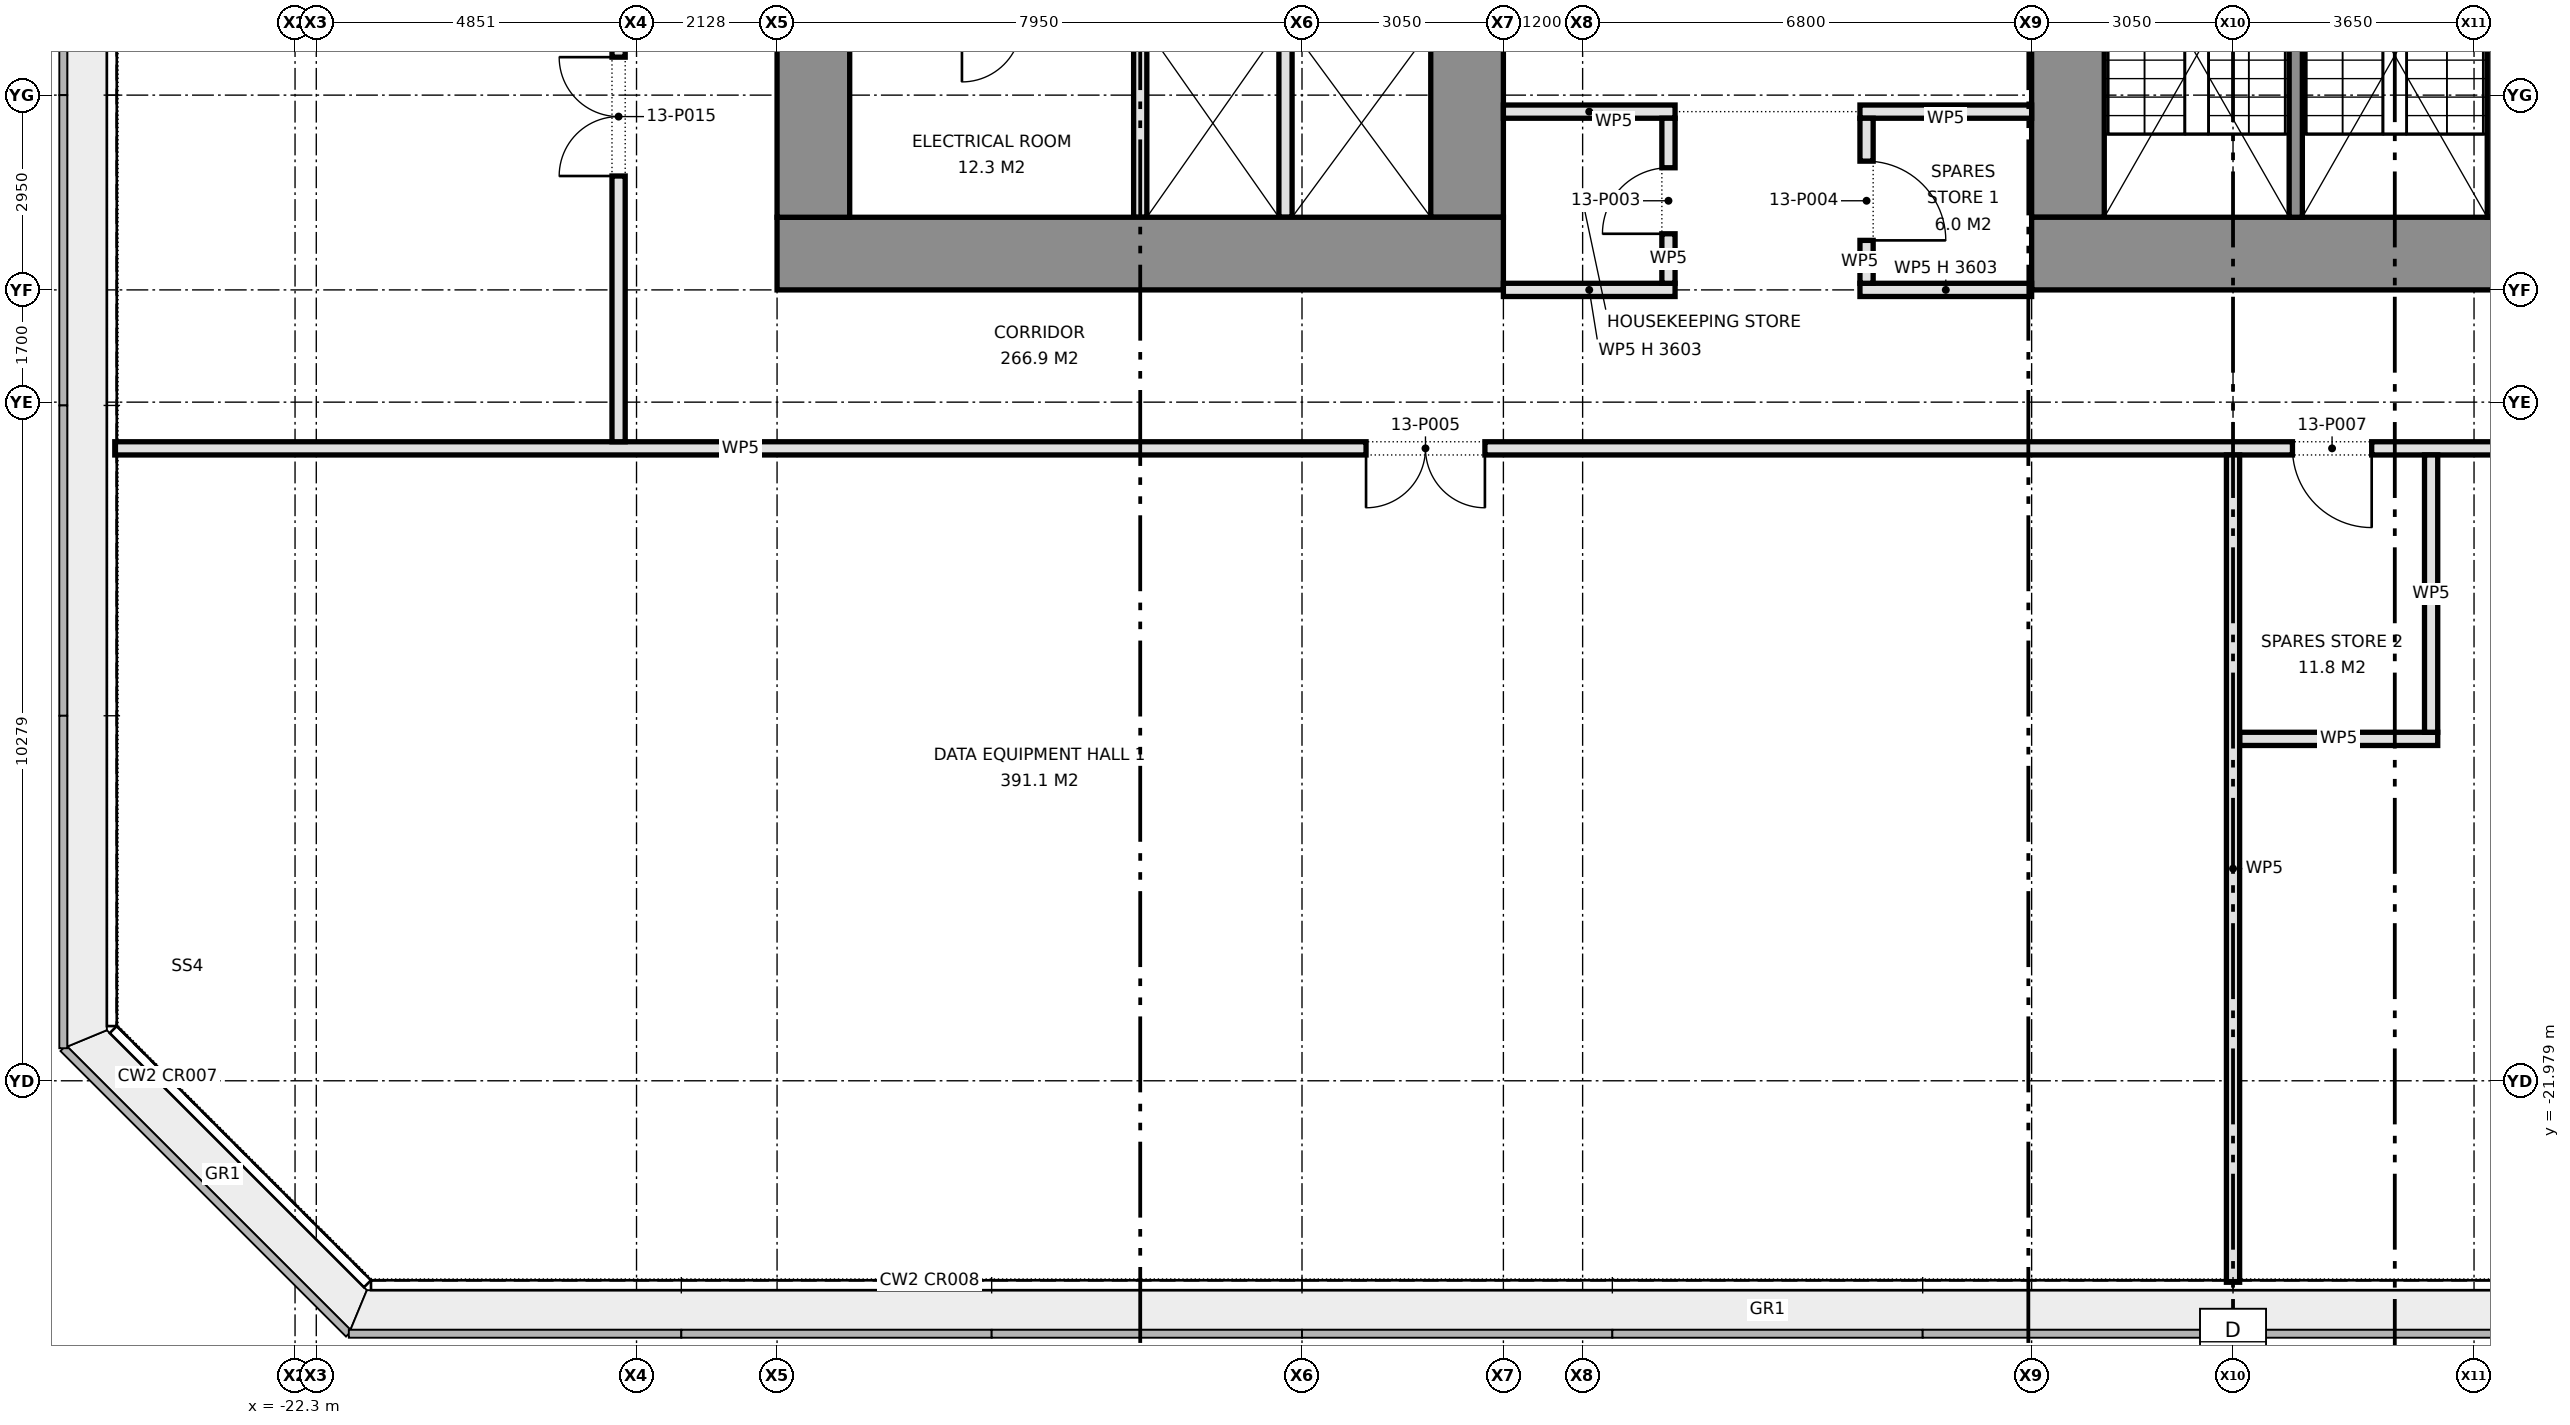
"""IFC4 building model, lengths in metres.
Left out: names, types, materials, properties, quantities, classifications, styles, units other than length and angle.
Written with IfcOpenShell. Run it as: python <this file> out.ifc"""

import sys

from ifc_helpers import new_model, si_unit, direction, frame, frame_2d, origin, place, context, subcontext, project, spatial, rectangle, extrude, element, fill, save


model = new_model("IFC4")
c1 = context("Model", 3, precision=1e-05, world=origin(), true_north=direction((0.0, 1.0)))
c2 = subcontext(c1, "Body", "Model", "MODEL_VIEW")
j1 = project(units=[si_unit("LENGTHUNIT", "METRE"), si_unit("PLANEANGLEUNIT", "RADIAN")], contexts=[c1])
p1 = place(None, origin())
s1 = spatial("IfcSite", under=j1, at=p1, CompositionType="ELEMENT")
p2 = place(p1, origin())
s2 = spatial("IfcBuilding", under=s1, at=p2, CompositionType="ELEMENT")
p3 = place(p2, frame((0.0, 0.0, 59.3)))
s3 = spatial("IfcBuildingStorey", under=s2, at=p3, CompositionType="ELEMENT", Elevation=59.3)
p4 = place(p3, frame((-15.0, -9.45, 0.0), z_axis=(0.0, 0.0, 1.0), x_axis=(1.0, 0.0, 0.0)))
e1 = element("IfcWall", 1, at=p4, inside=s3, PredefinedType="SHEAR", context=c2, shape_type="SweptSolid", body=[
    extrude(rectangle(XDim=11.0, YDim=1.1, at=frame_2d((5.5, 0.0))), origin(), (0.0, 0.0, 1.0), 4.55),
])
for number, where, z_axis, x_axis in (
    (2, (-14.45, -8.9, 0.0), (0.0, 0.0, 1.0), (0.0, 1.0, 0.0)),
    (3, (-4.55, -8.9, 0.0), (0.0, 0.0, 1.0), (0.0, 1.0, 0.0)),
):
    element("IfcWall", number, at=place(p3, frame(where, z_axis=z_axis, x_axis=x_axis)), inside=s3, PredefinedType="SHEAR", context=c2, shape_type="SweptSolid", body=[
        extrude(rectangle(XDim=3.15, YDim=1.1, at=frame_2d((1.575, 0.0))), origin(), (0.0, 0.0, 1.0), 4.55),
    ])
for number, where, z_axis, x_axis in (
    (4, (-9.5, -8.9, 0.0), (0.0, 0.0, 1.0), (0.0, 1.0, 0.0)),
    (5, (-7.3, -8.9, 0.0), (0.0, 0.0, 1.0), (0.0, 1.0, 0.0)),
):
    element("IfcWall", number, at=place(p3, frame(where, z_axis=z_axis, x_axis=x_axis)), inside=s3, PredefinedType="PARTITIONING", context=c2, shape_type="SweptSolid", body=[
        extrude(rectangle(XDim=2.85, YDim=0.2, at=frame_2d((1.425, 0.0))), origin(), (0.0, 0.0, 1.0), 4.55),
    ])
p5 = place(p3, frame((15.0, -9.45, 0.0), z_axis=(0.0, 0.0, 1.0), x_axis=(-1.0, 0.0, 0.0)))
e6 = element("IfcWall", 6, at=p5, inside=s3, PredefinedType="SHEAR", context=c2, shape_type="SweptSolid", body=[
    extrude(rectangle(XDim=11.0, YDim=1.1, at=frame_2d((5.5, 0.0))), origin(), (0.0, 0.0, 1.0), 4.55),
])
p6 = place(p3, frame((4.55, -1.55, 0.0), z_axis=(0.0, 0.0, 1.0), x_axis=(0.0, -1.0, 0.0)))
e7 = element("IfcWall", 7, at=p6, inside=s3, PredefinedType="SHEAR", context=c2, shape_type="SweptSolid", body=[
    extrude(rectangle(XDim=7.35, YDim=1.1, at=frame_2d((3.675, 0.0))), origin(), (0.0, 0.0, 1.0), 4.55),
])
for number, where, z_axis, x_axis in (
    (8, (11.0, -2.38, 0.0), (0.0, 0.0, 1.0), (0.0, -1.0, 0.0)),
    (9, (8.0, -2.38, 0.0), (0.0, 0.0, 1.0), (0.0, -1.0, 0.0)),
):
    element("IfcWall", number, at=place(p3, frame(where, z_axis=z_axis, x_axis=x_axis)), inside=s3, PredefinedType="SHEAR", context=c2, shape_type="SweptSolid", body=[
        extrude(rectangle(XDim=6.52, YDim=0.2, at=frame_2d((3.26, 0.0))), origin(), (0.0, 0.0, 1.0), 4.55),
    ])
p7 = place(p3, frame((7.15, -16.8, 0.0), z_axis=(0.0, 0.0, 1.0), x_axis=(1.0, 0.0, 0.0)))
e10 = element("IfcWall", 10, at=p7, inside=s3, PredefinedType="PARTITIONING", context=c2, shape_type="SweptSolid", body=[
    extrude(rectangle(XDim=3.0, YDim=0.2, at=frame_2d((1.5, 0.0))), origin(), (0.0, 0.0, 1.0), 4.55),
])
p8 = place(p3, frame((-25.03, -12.4, 0.0), z_axis=(0.0, 0.0, 1.0), x_axis=(1.0, 0.0, 0.0)))
e11 = element("IfcWall", 11, at=p8, inside=s3, PredefinedType="PARTITIONING", context=c2, shape_type="SweptSolid", body=[
    extrude(rectangle(XDim=50.06, YDim=0.2, at=frame_2d((25.03, 0.0))), origin(), (0.0, 0.0, 1.0), 4.55),
])
p9 = place(p8, frame((18.95, 0.0, 0.0)))
e12 = element("IfcOpeningElement", 12, at=p9, cuts=e11, PredefinedType="OPENING", context=c2, shape_type="SweptSolid", body=[
    extrude(rectangle(XDim=1.8, YDim=2.1, at=frame_2d((0.9, 1.05))), frame((0.0, 0.11, 0.0), z_axis=(0.0, -1.0, 0.0), x_axis=(1.0, 0.0, 0.0)), (0.0, 0.0, 1.0), 0.22),
])
p10 = place(p8, frame((37.86, 0.0, 0.0)))
e13 = element("IfcOpeningElement", 13, at=p10, cuts=e11, PredefinedType="OPENING", context=c2, shape_type="SweptSolid", body=[
    extrude(rectangle(XDim=1.8, YDim=2.1, at=frame_2d((0.9, 1.05))), frame((0.0, 0.11, 0.0), z_axis=(0.0, -1.0, 0.0), x_axis=(1.0, 0.0, 0.0)), (0.0, 0.0, 1.0), 0.22),
])
p11 = place(p8, frame((32.98, 0.0, 0.0)))
e14 = element("IfcOpeningElement", 14, at=p11, cuts=e11, PredefinedType="OPENING", context=c2, shape_type="SweptSolid", body=[
    extrude(rectangle(XDim=1.2, YDim=2.1, at=frame_2d((0.6, 1.05))), frame((0.0, 0.11, 0.0), z_axis=(0.0, -1.0, 0.0), x_axis=(1.0, 0.0, 0.0)), (0.0, 0.0, 1.0), 0.22),
])
for number, where, z_axis, x_axis in (
    (15, (-4.0, -10.0, 0.0), (0.0, 0.0, 1.0), (1.0, 0.0, 0.0)),
    (16, (1.4, -10.0, 0.0), (0.0, 0.0, 1.0), (1.0, 0.0, 0.0)),
):
    element("IfcWall", number, at=place(p3, frame(where, z_axis=z_axis, x_axis=x_axis)), inside=s3, PredefinedType="PARTITIONING", context=c2, shape_type="SweptSolid", body=[
        extrude(rectangle(XDim=2.6, YDim=0.2, at=frame_2d((1.3, 0.0))), origin(), (0.0, 0.0, 1.0), 3.603),
    ])
for number, where, z_axis, x_axis in (
    (17, (-4.0, -7.3, 0.0), (0.0, 0.0, 1.0), (1.0, 0.0, 0.0)),
    (18, (1.4, -7.3, 0.0), (0.0, 0.0, 1.0), (1.0, 0.0, 0.0)),
):
    element("IfcWall", number, at=place(p3, frame(where, z_axis=z_axis, x_axis=x_axis)), inside=s3, PredefinedType="PARTITIONING", context=c2, shape_type="SweptSolid", body=[
        extrude(rectangle(XDim=2.6, YDim=0.2, at=frame_2d((1.3, 0.0))), origin(), (0.0, 0.0, 1.0), 4.55),
    ])
p12 = place(p3, frame((10.05, -16.7, 0.0), z_axis=(0.0, 0.0, 1.0), x_axis=(0.0, 1.0, 0.0)))
e19 = element("IfcWall", 19, at=p12, inside=s3, PredefinedType="PARTITIONING", context=c2, shape_type="SweptSolid", body=[
    extrude(rectangle(XDim=4.2, YDim=0.2, at=frame_2d((2.1, 0.0))), origin(), (0.0, 0.0, 1.0), 4.55),
])
p13 = place(p3, frame((7.05, -25.03, 0.0), z_axis=(0.0, 0.0, 1.0), x_axis=(0.0, 1.0, 0.0)))
e20 = element("IfcWall", 20, at=p13, inside=s3, PredefinedType="PARTITIONING", context=c2, shape_type="SweptSolid", body=[
    extrude(rectangle(XDim=12.53, YDim=0.2, at=frame_2d((6.265, 0.0))), origin(), (0.0, 0.0, 1.0), 4.55),
])
p14 = place(p3, frame((1.5, -9.9, 0.0), z_axis=(0.0, 0.0, 1.0), x_axis=(0.0, 1.0, 0.0)))
e21 = element("IfcWall", 21, at=p14, inside=s3, PredefinedType="PARTITIONING", context=c2, shape_type="SweptSolid", body=[
    extrude(rectangle(XDim=2.5, YDim=0.2, at=frame_2d((1.25, 0.0))), origin(), (0.0, 0.0, 1.0), 4.55),
])
p15 = place(p14, frame((0.65, 0.0, 0.0)))
e22 = element("IfcOpeningElement", 22, at=p15, cuts=e21, PredefinedType="OPENING", context=c2, shape_type="SweptSolid", body=[
    extrude(rectangle(XDim=1.2, YDim=2.1, at=frame_2d((0.6, 1.05))), frame((0.0, 0.11, 0.0), z_axis=(0.0, -1.0, 0.0), x_axis=(1.0, 0.0, 0.0)), (0.0, 0.0, 1.0), 0.22),
])
p16 = place(p3, frame((-1.5, -9.9, 0.0), z_axis=(0.0, 0.0, 1.0), x_axis=(0.0, 1.0, 0.0)))
e23 = element("IfcWall", 23, at=p16, inside=s3, PredefinedType="PARTITIONING", context=c2, shape_type="SweptSolid", body=[
    extrude(rectangle(XDim=2.5, YDim=0.2, at=frame_2d((1.25, 0.0))), origin(), (0.0, 0.0, 1.0), 4.55),
])
p17 = place(p16, frame((0.75, 0.0, 0.0)))
e24 = element("IfcOpeningElement", 24, at=p17, cuts=e23, PredefinedType="OPENING", context=c2, shape_type="SweptSolid", body=[
    extrude(rectangle(XDim=1.0, YDim=2.1, at=frame_2d((0.5, 1.05))), frame((0.0, 0.11, 0.0), z_axis=(0.0, -1.0, 0.0), x_axis=(1.0, 0.0, 0.0)), (0.0, 0.0, 1.0), 0.22),
])
p18 = place(p3, frame((-17.4, -12.3, 0.0), z_axis=(0.0, 0.0, 1.0), x_axis=(0.0, 1.0, 0.0)))
e25 = element("IfcWall", 25, at=p18, inside=s3, PredefinedType="PARTITIONING", context=c2, shape_type="SweptSolid", body=[
    extrude(rectangle(XDim=28.2, YDim=0.2, at=frame_2d((14.1, 0.0))), origin(), (0.0, 0.0, 1.0), 4.55),
])
p19 = place(p18, frame((4.025, 0.0, 0.0)))
e26 = element("IfcOpeningElement", 26, at=p19, cuts=e25, PredefinedType="OPENING", context=c2, shape_type="SweptSolid", body=[
    extrude(rectangle(XDim=1.8, YDim=2.1, at=frame_2d((0.9, 1.05))), frame((0.0, 0.11, 0.0), z_axis=(0.0, -1.0, 0.0), x_axis=(1.0, 0.0, 0.0)), (0.0, 0.0, 1.0), 0.22),
])
p20 = place(p18, frame((20.525, 0.0, 0.0)))
e27 = element("IfcOpeningElement", 27, at=p20, cuts=e25, PredefinedType="OPENING", context=c2, shape_type="SweptSolid", body=[
    extrude(rectangle(XDim=1.8, YDim=2.1, at=frame_2d((0.9, 1.05))), frame((0.0, 0.11, 0.0), z_axis=(0.0, -1.0, 0.0), x_axis=(1.0, 0.0, 0.0)), (0.0, 0.0, 1.0), 0.22),
])
p21 = place(p18, frame((10.95, 0.0, 0.0)))
e28 = element("IfcOpeningElement", 28, at=p21, cuts=e25, PredefinedType="OPENING", context=c2, shape_type="SweptSolid", body=[
    extrude(rectangle(XDim=1.0, YDim=2.1, at=frame_2d((0.5, 1.05))), frame((0.0, 0.11, 0.0), z_axis=(0.0, -1.0, 0.0), x_axis=(1.0, 0.0, 0.0)), (0.0, 0.0, 1.0), 0.22),
])
p22 = place(p18, frame((13.95, 0.0, 0.0)))
e29 = element("IfcOpeningElement", 29, at=p22, cuts=e25, PredefinedType="OPENING", context=c2, shape_type="SweptSolid", body=[
    extrude(rectangle(XDim=1.0, YDim=2.1, at=frame_2d((0.5, 1.05))), frame((0.0, 0.11, 0.0), z_axis=(0.0, -1.0, 0.0), x_axis=(1.0, 0.0, 0.0)), (0.0, 0.0, 1.0), 0.22),
])
p23 = place(p18, frame((16.55, 0.0, 0.0)))
e30 = element("IfcOpeningElement", 30, at=p23, cuts=e25, PredefinedType="OPENING", context=c2, shape_type="SweptSolid", body=[
    extrude(rectangle(XDim=1.0, YDim=2.1, at=frame_2d((0.5, 1.05))), frame((0.0, 0.11, 0.0), z_axis=(0.0, -1.0, 0.0), x_axis=(1.0, 0.0, 0.0)), (0.0, 0.0, 1.0), 0.22),
])
p24 = place(p17, origin())
e31 = element("IfcDoor", 31, at=p24, inside=s3, OperationType="SINGLE_SWING_LEFT", PredefinedType="DOOR", context=c2, shape_type="SweptSolid", body=[
    extrude(rectangle(XDim=1.0, YDim=2.1, at=frame_2d((0.5, 1.05))), frame((0.0, 0.025, 0.0), z_axis=(0.0, -1.0, 0.0), x_axis=(1.0, 0.0, 0.0)), (0.0, 0.0, 1.0), 0.05),
])
fill(e24, e31)
p25 = place(p15, frame((1.2, 0.0, 0.0), z_axis=(0.0, 0.0, 1.0), x_axis=(-1.0, 0.0, 0.0)))
e32 = element("IfcDoor", 32, at=p25, inside=s3, OperationType="SINGLE_SWING_RIGHT", PredefinedType="DOOR", context=c2, shape_type="SweptSolid", body=[
    extrude(rectangle(XDim=1.2, YDim=2.1, at=frame_2d((0.6, 1.05))), frame((0.0, 0.025, 0.0), z_axis=(0.0, -1.0, 0.0), x_axis=(1.0, 0.0, 0.0)), (0.0, 0.0, 1.0), 0.05),
])
fill(e22, e32)
p26 = place(p9, frame((1.8, 0.0, 0.0), z_axis=(0.0, 0.0, 1.0), x_axis=(-1.0, 0.0, 0.0)))
e33 = element("IfcDoor", 33, at=p26, inside=s3, OperationType="DOUBLE_DOOR_SINGLE_SWING", PredefinedType="DOOR", context=c2, shape_type="SweptSolid", body=[
    extrude(rectangle(XDim=1.8, YDim=2.1, at=frame_2d((0.9, 1.05))), frame((0.0, 0.025, 0.0), z_axis=(0.0, -1.0, 0.0), x_axis=(1.0, 0.0, 0.0)), (0.0, 0.0, 1.0), 0.05),
])
fill(e12, e33)
p27 = place(p11, frame((1.2, 0.0, 0.0), z_axis=(0.0, 0.0, 1.0), x_axis=(-1.0, 0.0, 0.0)))
e34 = element("IfcDoor", 34, at=p27, inside=s3, OperationType="SINGLE_SWING_LEFT", PredefinedType="DOOR", context=c2, shape_type="SweptSolid", body=[
    extrude(rectangle(XDim=1.2, YDim=2.1, at=frame_2d((0.6, 1.05))), frame((0.0, 0.025, 0.0), z_axis=(0.0, -1.0, 0.0), x_axis=(1.0, 0.0, 0.0)), (0.0, 0.0, 1.0), 0.05),
])
fill(e14, e34)
p28 = place(p19, origin())
e35 = element("IfcDoor", 35, at=p28, inside=s3, OperationType="DOUBLE_DOOR_SINGLE_SWING", PredefinedType="DOOR", context=c2, shape_type="SweptSolid", body=[
    extrude(rectangle(XDim=1.8, YDim=2.1, at=frame_2d((0.9, 1.05))), frame((0.0, 0.025, 0.0), z_axis=(0.0, -1.0, 0.0), x_axis=(1.0, 0.0, 0.0)), (0.0, 0.0, 1.0), 0.05),
])
fill(e26, e35)
save(model, sys.argv[1])
